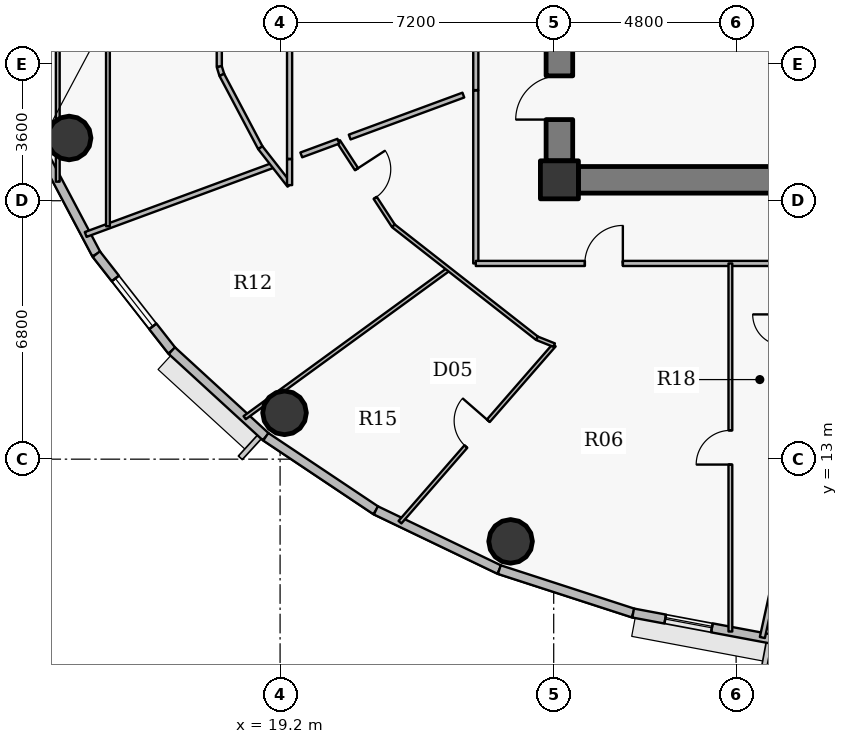
"""IFC4 building model, lengths in metres.
Left out: names, types, materials, properties, quantities, classifications, styles, units other than length and angle.
Written with IfcOpenShell. Run it as: python <this file> out.ifc"""

import sys

from ifc_helpers import new_model, si_unit, direction, frame, frame_2d, origin, origin_2d, place, context, subcontext, project, spatial, rectangle, hollow_circle, extrude, source, transform, mapped, element, fill, save


model = new_model("IFC4")
c1 = context("Model", 3, precision=1e-05, world=origin(), true_north=direction((0.0, 1.0)))
c2 = subcontext(c1, "Body", "Model", "MODEL_VIEW")
j1 = project(units=[si_unit("LENGTHUNIT", "METRE"), si_unit("PLANEANGLEUNIT", "RADIAN")], contexts=[c1])
p1 = place(None, origin())
s1 = spatial("IfcSite", under=j1, at=p1, CompositionType="ELEMENT")
p2 = place(p1, origin())
s2 = spatial("IfcBuilding", under=s1, at=p2, CompositionType="ELEMENT")
p3 = place(p2, frame((0.0, 0.0, 217.8)))
s3 = spatial("IfcBuildingStorey", under=s2, at=p3, CompositionType="ELEMENT", Elevation=217.8)
p4 = place(p3, frame((26.55, 20.35, 0.0), z_axis=(0.0, 0.0, 1.0), x_axis=(1.0, 0.0, 0.0)))
e1 = element("IfcColumn", 1, at=p4, inside=s3, PredefinedType="COLUMN", context=c2, shape_type="SweptSolid", body=[
    extrude(rectangle(XDim=1.0, YDim=1.0, at=origin_2d()), origin(), (0.0, 0.0, 1.0), 3.75),
])
p5 = place(p3, frame((44.95, 20.35, 0.0), z_axis=(0.0, 0.0, 1.0), x_axis=(-1.0, 0.0, 0.0)))
e2 = element("IfcWall", 2, at=p5, inside=s3, PredefinedType="SHEAR", context=c2, shape_type="SweptSolid", body=[
    extrude(rectangle(XDim=17.9, YDim=0.7, at=frame_2d((8.95, 0.0))), origin(), (0.0, 0.0, 1.0), 3.05),
])
p6 = place(p5, frame((9.7, 0.0, 0.0)))
e3 = element("IfcOpeningElement", 3, at=p6, cuts=e2, PredefinedType="OPENING", context=c2, shape_type="SweptSolid", body=[
    extrude(rectangle(XDim=1.15, YDim=2.15, at=origin_2d()), frame((0.575, 0.36, 1.075), z_axis=(0.0, -1.0, 0.0), x_axis=(1.0, 0.0, 0.0)), (0.0, 0.0, 1.0), 0.72),
])
p7 = place(p3, frame((26.55, 20.85, 0.0), z_axis=(0.0, 0.0, 1.0), x_axis=(0.0, 1.0, 0.0)))
e4 = element("IfcWall", 4, at=p7, inside=s3, PredefinedType="SHEAR", context=c2, shape_type="SweptSolid", body=[
    extrude(rectangle(XDim=12.3, YDim=0.7, at=frame_2d((6.15, 0.0))), origin(), (0.0, 0.0, 1.0), 3.05),
])
p8 = place(p7, frame((1.085, 0.0, 0.0)))
e5 = element("IfcOpeningElement", 5, at=p8, cuts=e4, PredefinedType="OPENING", context=c2, shape_type="SweptSolid", body=[
    extrude(rectangle(XDim=1.15, YDim=2.15, at=origin_2d()), frame((0.575, 0.36, 1.075), z_axis=(0.0, -1.0, 0.0), x_axis=(1.0, 0.0, 0.0)), (0.0, 0.0, 1.0), 0.72),
])
for number, where, z_axis, x_axis in (
    (6, (13.649, 21.451, 0.0), (0.0, 0.0, 1.0), (1.0, 0.0, 0.0)),
    (7, (19.317, 14.219, 0.0), (0.0, 0.0, 1.0), (1.0, 0.0, 0.0)),
    (8, (25.265, 10.836, 0.0), (0.0, 0.0, 1.0), (1.0, 0.0, 0.0)),
):
    element("IfcColumn", number, at=place(p3, frame(where, z_axis=z_axis, x_axis=x_axis)), inside=s3, PredefinedType="COLUMN", context=c2, shape_type="SweptSolid", body=[
        extrude(hollow_circle(Radius=0.575, WallThickness=0.036, at=origin_2d()), origin(), (0.0, 0.0, 1.0), 3.75),
    ])
p9 = place(p3, frame((14.364, 18.395, 0.0), z_axis=(0.0, 0.0, 1.0), x_axis=(-0.46766049993, 0.883908172157, 0.0)))
e9 = element("IfcWall", 9, at=p9, inside=s3, PredefinedType="SOLIDWALL", context=c2, shape_type="SweptSolid", body=[
    extrude(rectangle(XDim=3.11, YDim=0.24, at=frame_2d((1.555, 0.0))), origin(), (0.0, 0.0, 1.0), 3.5),
])
p10 = place(p3, frame((16.352, 15.855, 0.0), z_axis=(0.0, 0.0, 1.0), x_axis=(-0.616312344705, 0.787501805562, 0.0)))
e10 = element("IfcWall", 10, at=p10, inside=s3, PredefinedType="SOLIDWALL", context=c2, shape_type="SweptSolid", body=[
    extrude(rectangle(XDim=3.225, YDim=0.24, at=frame_2d((1.612, 0.0))), origin(), (0.0, 0.0, 1.0), 3.5),
])
p11 = place(p10, frame((0.812, 0.0, 0.9)))
e11 = element("IfcOpeningElement", 11, at=p11, cuts=e10, PredefinedType="OPENING", context=c2, shape_type="SweptSolid", body=[
    extrude(rectangle(XDim=1.6, YDim=1.75, at=origin_2d()), frame((0.8, 0.13, 0.875), z_axis=(0.0, -1.0, 0.0), x_axis=(1.0, 0.0, 0.0)), (0.0, 0.0, 1.0), 0.26),
])
p12 = place(p3, frame((18.824, 13.589, 0.0), z_axis=(0.0, 0.0, 1.0), x_axis=(-0.737123922599, 0.675757591694, 0.0)))
e12 = element("IfcWall", 12, at=p12, inside=s3, PredefinedType="SOLIDWALL", context=c2, shape_type="SweptSolid", body=[
    extrude(rectangle(XDim=3.354, YDim=0.24, at=frame_2d((1.677, 0.0))), origin(), (0.0, 0.0, 1.0), 3.5),
])
p13 = place(p3, frame((21.72, 11.652, 0.0), z_axis=(0.0, 0.0, 1.0), x_axis=(-0.831262496074, 0.555880079352, 0.0)))
e13 = element("IfcWall", 13, at=p13, inside=s3, PredefinedType="SOLIDWALL", context=c2, shape_type="SweptSolid", body=[
    extrude(rectangle(XDim=3.484, YDim=0.24, at=frame_2d((1.742, 0.0))), origin(), (0.0, 0.0, 1.0), 3.5),
])
p14 = place(p3, frame((24.969, 10.094, 0.0), z_axis=(0.0, 0.0, 1.0), x_axis=(-0.901598104751, 0.432574684313, 0.0)))
e14 = element("IfcWall", 14, at=p14, inside=s3, PredefinedType="SOLIDWALL", context=c2, shape_type="SweptSolid", body=[
    extrude(rectangle(XDim=3.604, YDim=0.24, at=frame_2d((1.802, 0.0))), origin(), (0.0, 0.0, 1.0), 3.5),
])
p15 = place(p3, frame((28.491, 8.951, 0.0), z_axis=(0.0, 0.0, 1.0), x_axis=(-0.951210789182, 0.308541787354, 0.0)))
e15 = element("IfcWall", 15, at=p15, inside=s3, PredefinedType="SOLIDWALL", context=c2, shape_type="SweptSolid", body=[
    extrude(rectangle(XDim=3.702, YDim=0.24, at=frame_2d((1.851, 0.0))), origin(), (0.0, 0.0, 1.0), 3.5),
])
p16 = place(p3, frame((32.198, 8.254, 0.0), z_axis=(0.0, 0.0, 1.0), x_axis=(-0.982784898575, 0.184753465822, 0.0)))
e16 = element("IfcWall", 16, at=p16, inside=s3, PredefinedType="SOLIDWALL", context=c2, shape_type="SweptSolid", body=[
    extrude(rectangle(XDim=3.773, YDim=0.24, at=frame_2d((1.886, 0.0))), origin(), (0.0, 0.0, 1.0), 3.5),
])
p17 = place(p16, frame((1.664, 0.0, 0.9)))
e17 = element("IfcOpeningElement", 17, at=p17, cuts=e16, PredefinedType="OPENING", context=c2, shape_type="SweptSolid", body=[
    extrude(rectangle(XDim=1.25, YDim=1.65, at=origin_2d()), frame((0.625, 0.13, 0.825), z_axis=(0.0, -1.0, 0.0), x_axis=(1.0, 0.0, 0.0)), (0.0, 0.0, 1.0), 0.26),
])
p18 = place(p3, frame((13.35, 20.301, 0.0), z_axis=(0.0, 0.0, 1.0), x_axis=(0.0, 1.0, 0.0)))
e18 = element("IfcWall", 18, at=p18, inside=s3, PredefinedType="PARTITIONING", context=c2, shape_type="SweptSolid", body=[
    extrude(rectangle(XDim=10.05, YDim=0.1, at=frame_2d((5.025, 0.0))), origin(), (0.0, 0.0, 1.0), 2.935),
])
p19 = place(p3, frame((14.085, 18.912, 0.0), z_axis=(0.0, 0.0, 1.0), x_axis=(0.938158194698, 0.346206877055, 0.0)))
e19 = element("IfcWall", 19, at=p19, inside=s3, PredefinedType="PARTITIONING", context=c2, shape_type="SweptSolid", body=[
    extrude(rectangle(XDim=5.278, YDim=0.135, at=frame_2d((2.639, 0.0))), origin(), (0.0, 0.0, 1.0), 2.985),
])
p20 = place(p3, frame((14.67, 19.128, 0.0), z_axis=(0.0, 0.0, 1.0), x_axis=(0.0, 1.0, 0.0)))
e20 = element("IfcWall", 20, at=p20, inside=s3, PredefinedType="PARTITIONING", context=c2, shape_type="SweptSolid", body=[
    extrude(rectangle(XDim=11.028, YDim=0.1, at=frame_2d((5.514, 0.0))), origin(), (0.0, 0.0, 1.0), 2.935),
])
p21 = place(p20, frame((5.064, 0.0, 0.0)))
e21 = element("IfcOpeningElement", 21, at=p21, cuts=e20, PredefinedType="OPENING", context=c2, shape_type="SweptSolid", body=[
    extrude(rectangle(XDim=0.9, YDim=2.1, at=origin_2d()), frame((0.45, 0.06, 1.05), z_axis=(0.0, -1.0, 0.0), x_axis=(1.0, 0.0, 0.0)), (0.0, 0.0, 1.0), 0.12),
])
p22 = place(p3, frame((17.6, 23.328, 0.0), z_axis=(0.0, 0.0, 1.0), x_axis=(0.0, 1.0, 0.0)))
e22 = element("IfcWall", 22, at=p22, inside=s3, PredefinedType="PARTITIONING", context=c2, shape_type="SweptSolid", body=[
    extrude(rectangle(XDim=4.622, YDim=0.135, at=frame_2d((2.311, 0.0))), origin(), (0.0, 0.0, 1.0), 2.935),
])
p23 = place(p3, frame((17.6, 23.328, 0.0), z_axis=(0.0, 0.0, 1.0), x_axis=(0.292875000845, -0.956150738053, 0.0)))
e23 = element("IfcWall", 23, at=p23, inside=s3, PredefinedType="PARTITIONING", context=c2, shape_type="SweptSolid", body=[
    extrude(rectangle(XDim=0.227, YDim=0.135, at=frame_2d((0.113, 0.0))), origin(), (0.0, 0.0, 1.0), 3.5),
])
p24 = place(p3, frame((17.667, 23.111, 0.0), z_axis=(0.0, 0.0, 1.0), x_axis=(0.467675622269, -0.883900171024, 0.0)))
e24 = element("IfcWall", 24, at=p24, inside=s3, PredefinedType="PARTITIONING", context=c2, shape_type="SweptSolid", body=[
    extrude(rectangle(XDim=2.168, YDim=0.135, at=frame_2d((1.084, 0.0))), origin(), (0.0, 0.0, 1.0), 2.935),
])
p25 = place(p3, frame((18.268, 14.092, 0.0), z_axis=(0.0, 0.0, 1.0), x_axis=(0.808481640117, 0.588521399436, 0.0)))
e25 = element("IfcWall", 25, at=p25, inside=s3, PredefinedType="PARTITIONING", context=c2, shape_type="SweptSolid", body=[
    extrude(rectangle(XDim=6.641, YDim=0.1, at=frame_2d((3.32, 0.0))), origin(), (0.0, 0.0, 1.0), 2.985),
])
p26 = place(p3, frame((18.681, 21.194, 0.0), z_axis=(0.0, 0.0, 1.0), x_axis=(0.616239706802, -0.787558647823, 0.0)))
e26 = element("IfcWall", 26, at=p26, inside=s3, PredefinedType="PARTITIONING", context=c2, shape_type="SweptSolid", body=[
    extrude(rectangle(XDim=1.248, YDim=0.135, at=frame_2d((0.624, 0.0))), origin(), (0.0, 0.0, 1.0), 3.5),
])
p27 = place(p3, frame((19.45, 20.211, 0.0), z_axis=(0.0, 0.0, 1.0), x_axis=(0.0, 1.0, 0.0)))
e27 = element("IfcWall", 27, at=p27, inside=s3, PredefinedType="PARTITIONING", context=c2, shape_type="SweptSolid", body=[
    extrude(rectangle(XDim=0.681, YDim=0.135, at=frame_2d((0.34, 0.0))), origin(), (0.0, 0.0, 1.0), 3.5),
])
p28 = place(p3, frame((20.733, 21.366, 0.0), z_axis=(0.0, 0.0, 1.0), x_axis=(0.545375949152, -0.838191549758, 0.0)))
e28 = element("IfcWall", 28, at=p28, inside=s3, PredefinedType="PARTITIONING", context=c2, shape_type="SweptSolid", body=[
    extrude(rectangle(XDim=2.656, YDim=0.1, at=frame_2d((1.328, 0.0))), origin(), (0.0, 0.0, 1.0), 3.5),
])
p29 = place(p28, frame((0.878, 0.0, 0.0)))
e29 = element("IfcOpeningElement", 29, at=p29, cuts=e28, PredefinedType="OPENING", context=c2, shape_type="SweptSolid", body=[
    extrude(rectangle(XDim=0.9, YDim=2.1, at=origin_2d()), frame((0.45, 0.06, 1.05), z_axis=(0.0, -1.0, 0.0), x_axis=(1.0, 0.0, 0.0)), (0.0, 0.0, 1.0), 0.12),
])
p30 = place(p3, frame((22.182, 19.139, 0.0), z_axis=(0.0, 0.0, 1.0), x_axis=(0.787386902975, -0.616459134917, 0.0)))
e30 = element("IfcWall", 30, at=p30, inside=s3, PredefinedType="PARTITIONING", context=c2, shape_type="SweptSolid", body=[
    extrude(rectangle(XDim=4.799, YDim=0.1, at=frame_2d((2.399, 0.0))), origin(), (0.0, 0.0, 1.0), 2.935),
])
p31 = place(p3, frame((22.355, 11.342, 0.0), z_axis=(0.0, 0.0, 1.0), x_axis=(0.657017747133, 0.753875108989, 0.0)))
e31 = element("IfcWall", 31, at=p31, inside=s3, PredefinedType="PARTITIONING", context=c2, shape_type="SweptSolid", body=[
    extrude(rectangle(XDim=6.178, YDim=0.1, at=frame_2d((3.089, 0.0))), origin(), (0.0, 0.0, 1.0), 2.985),
])
p32 = place(p31, frame((2.639, 0.0, 0.0)))
e32 = element("IfcOpeningElement", 32, at=p32, cuts=e31, PredefinedType="OPENING", context=c2, shape_type="SweptSolid", body=[
    extrude(rectangle(XDim=0.9, YDim=2.1, at=origin_2d()), frame((0.45, 0.06, 1.05), z_axis=(0.0, -1.0, 0.0), x_axis=(1.0, 0.0, 0.0)), (0.0, 0.0, 1.0), 0.12),
])
p33 = place(p3, frame((24.35, 18.15, 0.0), z_axis=(0.0, 0.0, 1.0), x_axis=(0.0, 1.0, 0.0)))
e33 = element("IfcWall", 33, at=p33, inside=s3, PredefinedType="PARTITIONING", context=c2, shape_type="SweptSolid", body=[
    extrude(rectangle(XDim=4.551, YDim=0.135, at=frame_2d((2.275, 0.0))), origin(), (0.0, 0.0, 1.0), 2.935),
])
p34 = place(p3, frame((24.35, 18.15, 0.0), z_axis=(0.0, 0.0, 1.0), x_axis=(1.0, 0.0, 0.0)))
e34 = element("IfcWall", 34, at=p34, inside=s3, PredefinedType="PARTITIONING", context=c2, shape_type="SweptSolid", body=[
    extrude(rectangle(XDim=23.85, YDim=0.135, at=frame_2d((11.925, 0.0))), origin(), (0.0, 0.0, 1.0), 2.935),
])
p35 = place(p34, frame((2.87, 0.0, 0.0)))
e35 = element("IfcOpeningElement", 35, at=p35, cuts=e34, PredefinedType="OPENING", context=c2, shape_type="SweptSolid", body=[
    extrude(rectangle(XDim=1.0, YDim=2.15, at=origin_2d()), frame((0.5, 0.078, 1.075), z_axis=(0.0, -1.0, 0.0), x_axis=(1.0, 0.0, 0.0)), (0.0, 0.0, 1.0), 0.155),
])
p36 = place(p34, frame((16.13, 0.0, 0.0)))
e36 = element("IfcOpeningElement", 36, at=p36, cuts=e34, PredefinedType="OPENING", context=c2, shape_type="SweptSolid", body=[
    extrude(rectangle(XDim=1.0, YDim=2.15, at=origin_2d()), frame((0.5, 0.078, 1.075), z_axis=(0.0, -1.0, 0.0), x_axis=(1.0, 0.0, 0.0)), (0.0, 0.0, 1.0), 0.155),
])
p37 = place(p3, frame((25.961, 16.181, 0.0), z_axis=(0.0, 0.0, 1.0), x_axis=(0.928718060564, -0.370786682585, 0.0)))
e37 = element("IfcWall", 37, at=p37, inside=s3, PredefinedType="PARTITIONING", context=c2, shape_type="SweptSolid", body=[
    extrude(rectangle(XDim=0.488, YDim=0.1, at=frame_2d((0.244, 0.0))), origin(), (0.0, 0.0, 1.0), 3.5),
])
p38 = place(p3, frame((31.049, 8.465, 0.0), z_axis=(0.0, 0.0, 1.0), x_axis=(0.0, 1.0, 0.0)))
e38 = element("IfcWall", 38, at=p38, inside=s3, PredefinedType="PARTITIONING", context=c2, shape_type="SweptSolid", body=[
    extrude(rectangle(XDim=9.685, YDim=0.1, at=frame_2d((4.842, 0.0))), origin(), (0.0, 0.0, 1.0), 2.985),
])
p39 = place(p38, frame((4.392, 0.0, 0.0)))
e39 = element("IfcOpeningElement", 39, at=p39, cuts=e38, PredefinedType="OPENING", context=c2, shape_type="SweptSolid", body=[
    extrude(rectangle(XDim=0.9, YDim=2.1, at=origin_2d()), frame((0.45, 0.06, 1.05), z_axis=(0.0, -1.0, 0.0), x_axis=(1.0, 0.0, 0.0)), (0.0, 0.0, 1.0), 0.12),
])
p40 = place(p3, frame((31.891, 8.307, 0.0), z_axis=(0.0, 0.0, 1.0), x_axis=(0.214700779338, 0.976679873526, 0.0)))
e40 = element("IfcWall", 40, at=p40, inside=s3, PredefinedType="PARTITIONING", context=c2, shape_type="SweptSolid", body=[
    extrude(rectangle(XDim=2.632, YDim=0.135, at=frame_2d((1.316, 0.0))), origin(), (0.0, 0.0, 1.0), 2.985),
])
p41 = place(p3, frame((19.45, 26.05, 0.0), z_axis=(0.0, 0.0, 1.0), x_axis=(0.0, -1.0, 0.0)))
e41 = element("IfcWall", 41, at=p41, inside=s3, PredefinedType="PARTITIONING", context=c2, shape_type="SweptSolid", body=[
    extrude(rectangle(XDim=5.148, YDim=0.135, at=frame_2d((2.574, 0.0))), origin(), (0.0, 0.0, 1.0), 2.935),
])
p42 = place(p3, frame((26.2, 20.84, 0.0), z_axis=(0.0, 0.0, 1.0), x_axis=(0.0, -1.0, 0.0)))
e42 = element("IfcWall", 42, at=p42, inside=s3, PredefinedType="PARTITIONING", context=c2, shape_type="SweptSolid", body=[
    extrude(rectangle(XDim=0.84, YDim=0.135, at=frame_2d((0.42, 0.0))), origin(), (0.0, 0.0, 1.0), 3.5),
])
p43 = place(p3, frame((26.508, 20.0, 0.0), z_axis=(0.0, 0.0, 1.0), x_axis=(1.0, 0.0, 0.0)))
e43 = element("IfcWall", 43, at=p43, inside=s3, PredefinedType="PARTITIONING", context=c2, shape_type="SweptSolid", body=[
    extrude(rectangle(XDim=0.532, YDim=0.135, at=frame_2d((0.266, 0.0))), origin(), (0.0, 0.0, 1.0), 2.935),
])
p44 = place(p3, frame((24.35, 22.71, 0.0), z_axis=(0.0, 0.0, 1.0), x_axis=(0.0, 1.0, 0.0)))
e44 = element("IfcWall", 44, at=p44, inside=s3, PredefinedType="PARTITIONING", context=c2, shape_type="SweptSolid", body=[
    extrude(rectangle(XDim=3.34, YDim=0.135, at=frame_2d((1.67, 0.0))), origin(), (0.0, 0.0, 1.0), 2.935),
])
p45 = place(p3, frame((21.031, 21.476, 0.0), z_axis=(0.0, 0.0, 1.0), x_axis=(0.938166504217, 0.346184358926, 0.0)))
e45 = element("IfcWall", 45, at=p45, inside=s3, PredefinedType="PARTITIONING", context=c2, shape_type="SweptSolid", body=[
    extrude(rectangle(XDim=3.188, YDim=0.135, at=frame_2d((1.594, 0.0))), origin(), (0.0, 0.0, 1.0), 3.5),
])
p46 = place(p3, frame((19.758, 21.006, 0.0), z_axis=(0.0, 0.0, 1.0), x_axis=(0.938130503792, 0.346281905179, 0.0)))
e46 = element("IfcWall", 46, at=p46, inside=s3, PredefinedType="PARTITIONING", context=c2, shape_type="SweptSolid", body=[
    extrude(rectangle(XDim=1.04, YDim=0.135, at=frame_2d((0.52, 0.0))), origin(), (0.0, 0.0, 1.0), 3.5),
])
m1 = source(origin(), c2, "Body", "SweptSolid", [
    extrude(rectangle(XDim=1.6, YDim=1.75, at=origin_2d()), frame((0.8, 0.03, 0.875), z_axis=(0.0, -1.0, 0.0), x_axis=(1.0, 0.0, 0.0)), (0.0, 0.0, 1.0), 0.06),
])
p47 = place(p11, origin())
e47 = element("IfcWindow", 47, at=p47, inside=s3, PartitioningType="DOUBLE_PANEL_VERTICAL", PredefinedType="WINDOW", context=c2, shape_type="MappedRepresentation", body=[
    mapped(m1, transform((0.0, 0.0, 0.0), x_axis=(1.0, 0.0, 0.0), y_axis=(0.0, 1.0, 0.0), z_axis=(0.0, 0.0, 1.0), scale=1.0)),
])
fill(e11, e47)
m2 = source(origin(), c2, "Body", "SweptSolid", [
    extrude(rectangle(XDim=1.25, YDim=1.65, at=origin_2d()), frame((0.625, 0.03, 0.825), z_axis=(0.0, -1.0, 0.0), x_axis=(1.0, 0.0, 0.0)), (0.0, 0.0, 1.0), 0.06),
])
p48 = place(p17, origin())
e48 = element("IfcWindow", 48, at=p48, inside=s3, PartitioningType="SINGLE_PANEL", PredefinedType="WINDOW", context=c2, shape_type="MappedRepresentation", body=[
    mapped(m2, transform((0.0, 0.0, 0.0), x_axis=(1.0, 0.0, 0.0), y_axis=(0.0, 1.0, 0.0), z_axis=(0.0, 0.0, 1.0), scale=1.0)),
])
fill(e17, e48)
m3 = source(origin(), c2, "Body", "SweptSolid", [
    extrude(rectangle(XDim=1.15, YDim=2.15, at=origin_2d()), frame((0.575, 0.025, 1.075), z_axis=(0.0, -1.0, 0.0), x_axis=(1.0, 0.0, 0.0)), (0.0, 0.0, 1.0), 0.05),
])
p49 = place(p8, origin())
e49 = element("IfcDoor", 49, at=p49, inside=s3, OperationType="SINGLE_SWING_LEFT", PredefinedType="DOOR", context=c2, shape_type="MappedRepresentation", body=[
    mapped(m3, transform((0.0, 0.0, 0.0), x_axis=(1.0, 0.0, 0.0), y_axis=(0.0, 1.0, 0.0), z_axis=(0.0, 0.0, 1.0), scale=1.0)),
])
fill(e5, e49)
m4 = source(origin(), c2, "Body", "SweptSolid", [
    extrude(rectangle(XDim=1.0, YDim=2.15, at=origin_2d()), frame((0.5, 0.025, 1.075), z_axis=(0.0, -1.0, 0.0), x_axis=(1.0, 0.0, 0.0)), (0.0, 0.0, 1.0), 0.05),
])
p50 = place(p35, origin())
e50 = element("IfcDoor", 50, at=p50, inside=s3, OperationType="SINGLE_SWING_RIGHT", PredefinedType="DOOR", context=c2, shape_type="MappedRepresentation", body=[
    mapped(m4, transform((0.0, 0.0, 0.0), x_axis=(1.0, 0.0, 0.0), y_axis=(0.0, 1.0, 0.0), z_axis=(0.0, 0.0, 1.0), scale=1.0)),
])
fill(e35, e50)
m5 = source(origin(), c2, "Body", "SweptSolid", [
    extrude(rectangle(XDim=0.9, YDim=2.1, at=origin_2d()), frame((0.45, 0.025, 1.05), z_axis=(0.0, -1.0, 0.0), x_axis=(1.0, 0.0, 0.0)), (0.0, 0.0, 1.0), 0.05),
])
p51 = place(p29, origin())
e51 = element("IfcDoor", 51, at=p51, inside=s3, OperationType="SINGLE_SWING_LEFT", PredefinedType="DOOR", context=c2, shape_type="MappedRepresentation", body=[
    mapped(m5, transform((0.0, 0.0, 0.0), x_axis=(1.0, 0.0, 0.0), y_axis=(0.0, 1.0, 0.0), z_axis=(0.0, 0.0, 1.0), scale=1.0)),
])
fill(e29, e51)
p52 = place(p32, origin())
e52 = element("IfcDoor", 52, at=p52, inside=s3, OperationType="SINGLE_SWING_RIGHT", PredefinedType="DOOR", context=c2, shape_type="MappedRepresentation", body=[
    mapped(m5, transform((0.0, 0.0, 0.0), x_axis=(1.0, 0.0, 0.0), y_axis=(0.0, 1.0, 0.0), z_axis=(0.0, 0.0, 1.0), scale=1.0)),
])
fill(e32, e52)
p53 = place(p39, origin())
e53 = element("IfcDoor", 53, at=p53, inside=s3, OperationType="SINGLE_SWING_LEFT", PredefinedType="DOOR", context=c2, shape_type="MappedRepresentation", body=[
    mapped(m5, transform((0.0, 0.0, 0.0), x_axis=(1.0, 0.0, 0.0), y_axis=(0.0, 1.0, 0.0), z_axis=(0.0, 0.0, 1.0), scale=1.0)),
])
fill(e39, e53)
save(model, sys.argv[1])
